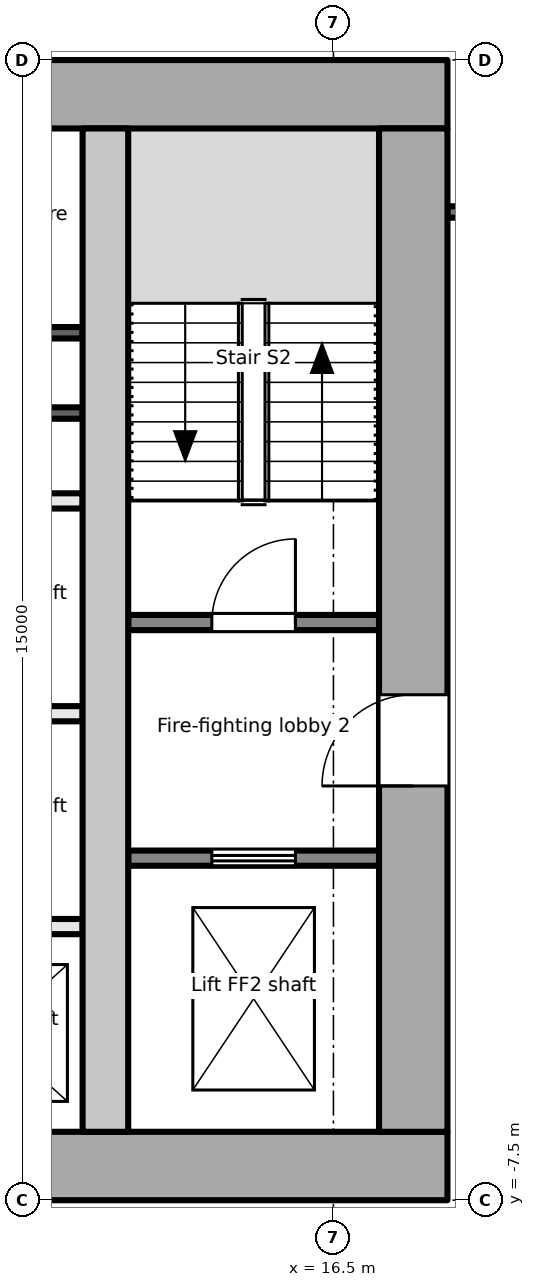
"""IFC4 building model, lengths in metres.
Left out: names, types, materials, properties, quantities, classifications, styles, units other than length and angle.
Written with IfcOpenShell. Run it as: python <this file> out.ifc"""

import sys

from ifc_helpers import new_model, si_unit, direction, frame, frame_2d, origin, place, context, subcontext, project, spatial, rectangle, extrude, element, fill, save


model = new_model("IFC4")
c1 = context("Model", 3, precision=1e-05, world=origin(), true_north=direction((0.0, 1.0)))
c2 = subcontext(c1, "Body", "Model", "MODEL_VIEW")
j1 = project(units=[si_unit("LENGTHUNIT", "METRE"), si_unit("PLANEANGLEUNIT", "RADIAN")], contexts=[c1])
p1 = place(None, origin())
s1 = spatial("IfcSite", under=j1, at=p1, CompositionType="ELEMENT")
p2 = place(p1, origin())
s2 = spatial("IfcBuilding", under=s1, at=p2, CompositionType="ELEMENT")
p3 = place(p2, frame((0.0, 0.0, 191.9)))
s3 = spatial("IfcBuildingStorey", under=s2, at=p3, CompositionType="ELEMENT", Elevation=191.9)
p4 = place(p3, frame((-18.0, -7.05, -0.2), z_axis=(0.0, 0.0, 1.0), x_axis=(1.0, 0.0, 0.0)))
e1 = element("IfcWall", 1, at=p4, inside=s3, PredefinedType="SHEAR", context=c2, shape_type="SweptSolid", body=[
    extrude(rectangle(XDim=36.0, YDim=0.9, at=frame_2d((18.0, 0.0))), origin(), (0.0, 0.0, 1.0), 3.9),
])
p5 = place(p4, frame((8.1, 0.0, 0.2)))
e2 = element("IfcOpeningElement", 2, at=p5, cuts=e1, PredefinedType="OPENING", context=c2, shape_type="SweptSolid", body=[
    extrude(rectangle(XDim=1.8, YDim=2.1, at=frame_2d((0.9, 1.05))), frame((0.0, 0.46, 0.0), z_axis=(0.0, -1.0, 0.0), x_axis=(1.0, 0.0, 0.0)), (0.0, 0.0, 1.0), 0.921),
])
p6 = place(p4, frame((16.8, 0.0, 0.2)))
e3 = element("IfcOpeningElement", 3, at=p6, cuts=e1, PredefinedType="OPENING", context=c2, shape_type="SweptSolid", body=[
    extrude(rectangle(XDim=2.4, YDim=2.1, at=frame_2d((1.2, 1.05))), frame((0.0, 0.46, 0.0), z_axis=(0.0, -1.0, 0.0), x_axis=(1.0, 0.0, 0.0)), (0.0, 0.0, 1.0), 0.921),
])
p7 = place(p4, frame((26.1, 0.0, 0.2)))
e4 = element("IfcOpeningElement", 4, at=p7, cuts=e1, PredefinedType="OPENING", context=c2, shape_type="SweptSolid", body=[
    extrude(rectangle(XDim=2.4, YDim=2.1, at=frame_2d((1.2, 1.05))), frame((0.0, 0.46, 0.0), z_axis=(0.0, -1.0, 0.0), x_axis=(1.0, 0.0, 0.0)), (0.0, 0.0, 1.0), 0.921),
])
p8 = place(p3, frame((-18.0, 7.05, -0.2), z_axis=(0.0, 0.0, 1.0), x_axis=(1.0, 0.0, 0.0)))
e5 = element("IfcWall", 5, at=p8, inside=s3, PredefinedType="SHEAR", context=c2, shape_type="SweptSolid", body=[
    extrude(rectangle(XDim=36.0, YDim=0.9, at=frame_2d((18.0, 0.0))), origin(), (0.0, 0.0, 1.0), 3.9),
])
p9 = place(p3, frame((17.55, -6.6, -0.2), z_axis=(0.0, 0.0, 1.0), x_axis=(0.0, 1.0, 0.0)))
e6 = element("IfcWall", 6, at=p9, inside=s3, PredefinedType="SHEAR", context=c2, shape_type="SweptSolid", body=[
    extrude(rectangle(XDim=13.2, YDim=0.9, at=frame_2d((6.6, 0.0))), origin(), (0.0, 0.0, 1.0), 3.9),
])
p10 = place(p9, frame((4.55, 0.0, 0.2)))
e7 = element("IfcOpeningElement", 7, at=p10, cuts=e6, PredefinedType="OPENING", context=c2, shape_type="SweptSolid", body=[
    extrude(rectangle(XDim=1.2, YDim=2.1, at=frame_2d((0.6, 1.05))), frame((0.0, 0.46, 0.0), z_axis=(0.0, -1.0, 0.0), x_axis=(1.0, 0.0, 0.0)), (0.0, 0.0, 1.0), 0.921),
])
p11 = place(p3, frame((13.5, -6.6, -0.2), z_axis=(0.0, 0.0, 1.0), x_axis=(0.0, 1.0, 0.0)))
e8 = element("IfcWall", 8, at=p11, inside=s3, PredefinedType="SHEAR", context=c2, shape_type="SweptSolid", body=[
    extrude(rectangle(XDim=13.2, YDim=0.6, at=frame_2d((6.6, 0.0))), origin(), (0.0, 0.0, 1.0), 3.9),
])
p12 = place(p3, frame((13.8, -3.0, 0.0), z_axis=(0.0, 0.0, 1.0), x_axis=(1.0, 0.0, 0.0)))
e9 = element("IfcWall", 9, at=p12, inside=s3, PredefinedType="PARTITIONING", context=c2, shape_type="SweptSolid", body=[
    extrude(rectangle(XDim=3.3, YDim=0.2, at=frame_2d((1.65, 0.0))), origin(), (0.0, 0.0, 1.0), 3.7),
])
p13 = place(p12, frame((1.1, 0.0, 0.0)))
e10 = element("IfcOpeningElement", 10, at=p13, cuts=e9, PredefinedType="OPENING", context=c2, shape_type="SweptSolid", body=[
    extrude(rectangle(XDim=1.1, YDim=2.1, at=frame_2d((0.55, 1.05))), frame((0.0, 0.111, 0.0), z_axis=(0.0, -1.0, 0.0), x_axis=(1.0, 0.0, 0.0)), (0.0, 0.0, 1.0), 0.221),
])
p14 = place(p3, frame((13.8, 0.1, 0.0), z_axis=(0.0, 0.0, 1.0), x_axis=(1.0, 0.0, 0.0)))
e11 = element("IfcWall", 11, at=p14, inside=s3, PredefinedType="PARTITIONING", context=c2, shape_type="SweptSolid", body=[
    extrude(rectangle(XDim=3.3, YDim=0.2, at=frame_2d((1.65, 0.0))), origin(), (0.0, 0.0, 1.0), 3.7),
])
p15 = place(p14, frame((1.1, 0.0, 0.0)))
e12 = element("IfcOpeningElement", 12, at=p15, cuts=e11, PredefinedType="OPENING", context=c2, shape_type="SweptSolid", body=[
    extrude(rectangle(XDim=1.1, YDim=2.1, at=frame_2d((0.55, 1.05))), frame((0.0, 0.111, 0.0), z_axis=(0.0, -1.0, 0.0), x_axis=(1.0, 0.0, 0.0)), (0.0, 0.0, 1.0), 0.221),
])
for number, where, z_axis, x_axis in (
    (13, (10.9, -3.9, 0.0), (0.0, 0.0, 1.0), (1.0, 0.0, 0.0)),
    (14, (10.9, -1.1, 0.0), (0.0, 0.0, 1.0), (1.0, 0.0, 0.0)),
    (15, (10.9, 1.7, 0.0), (0.0, 0.0, 1.0), (1.0, 0.0, 0.0)),
):
    element("IfcWall", number, at=place(p3, frame(where, z_axis=z_axis, x_axis=x_axis)), inside=s3, PredefinedType="PARTITIONING", context=c2, shape_type="SweptSolid", body=[
        extrude(rectangle(XDim=2.3, YDim=0.2, at=frame_2d((1.15, 0.0))), origin(), (0.0, 0.0, 1.0), 3.7),
    ])
for number, where, z_axis, x_axis in (
    (16, (10.9, 2.856, 0.0), (0.0, 0.0, 1.0), (1.0, 0.0, 0.0)),
    (17, (10.9, 3.912, 0.0), (0.0, 0.0, 1.0), (1.0, 0.0, 0.0)),
):
    element("IfcWall", number, at=place(p3, frame(where, z_axis=z_axis, x_axis=x_axis)), inside=s3, PredefinedType="PARTITIONING", context=c2, shape_type="SweptSolid", body=[
        extrude(rectangle(XDim=2.3, YDim=0.15, at=frame_2d((1.15, 0.0))), origin(), (0.0, 0.0, 1.0), 3.7),
    ])
p16 = place(p3, frame((18.0, 5.501, 0.0), z_axis=(0.0, 0.0, 1.0), x_axis=(1.0, 0.0, 0.0)))
e18 = element("IfcWall", 18, at=p16, inside=s3, PredefinedType="PARTITIONING", context=c2, shape_type="SweptSolid", body=[
    extrude(rectangle(XDim=2.325, YDim=0.15, at=frame_2d((1.163, 0.0))), origin(), (0.0, 0.0, 1.0), 3.7),
])
p17 = place(p16, frame((0.268, 0.0, 0.0)))
e19 = element("IfcOpeningElement", 19, at=p17, cuts=e18, PredefinedType="OPENING", context=c2, shape_type="SweptSolid", body=[
    extrude(rectangle(XDim=1.8, YDim=2.1, at=frame_2d((0.9, 1.05))), frame((0.0, 0.085, 0.0), z_axis=(0.0, -1.0, 0.0), x_axis=(1.0, 0.0, 0.0)), (0.0, 0.0, 1.0), 0.171),
])
p18 = place(p13, origin())
e20 = element("IfcDoor", 20, at=p18, inside=s3, OperationType="DOUBLE_DOOR_SLIDING", PredefinedType="DOOR", context=c2, shape_type="SweptSolid", body=[
    extrude(rectangle(XDim=1.1, YDim=2.1, at=frame_2d((0.55, 1.05))), frame((0.0, 0.025, 0.0), z_axis=(0.0, -1.0, 0.0), x_axis=(1.0, 0.0, 0.0)), (0.0, 0.0, 1.0), 0.05),
])
fill(e10, e20)
p19 = place(p10, origin())
e21 = element("IfcDoor", 21, at=p19, inside=s3, OperationType="SINGLE_SWING_LEFT", PredefinedType="DOOR", context=c2, shape_type="SweptSolid", body=[
    extrude(rectangle(XDim=1.2, YDim=2.1, at=frame_2d((0.6, 1.05))), frame((0.0, 0.025, 0.0), z_axis=(0.0, -1.0, 0.0), x_axis=(1.0, 0.0, 0.0)), (0.0, 0.0, 1.0), 0.05),
])
fill(e7, e21)
p20 = place(p15, origin())
e22 = element("IfcDoor", 22, at=p20, inside=s3, OperationType="SINGLE_SWING_RIGHT", PredefinedType="DOOR", context=c2, shape_type="SweptSolid", body=[
    extrude(rectangle(XDim=1.1, YDim=2.1, at=frame_2d((0.55, 1.05))), frame((0.0, 0.025, 0.0), z_axis=(0.0, -1.0, 0.0), x_axis=(1.0, 0.0, 0.0)), (0.0, 0.0, 1.0), 0.05),
])
fill(e12, e22)
save(model, sys.argv[1])
